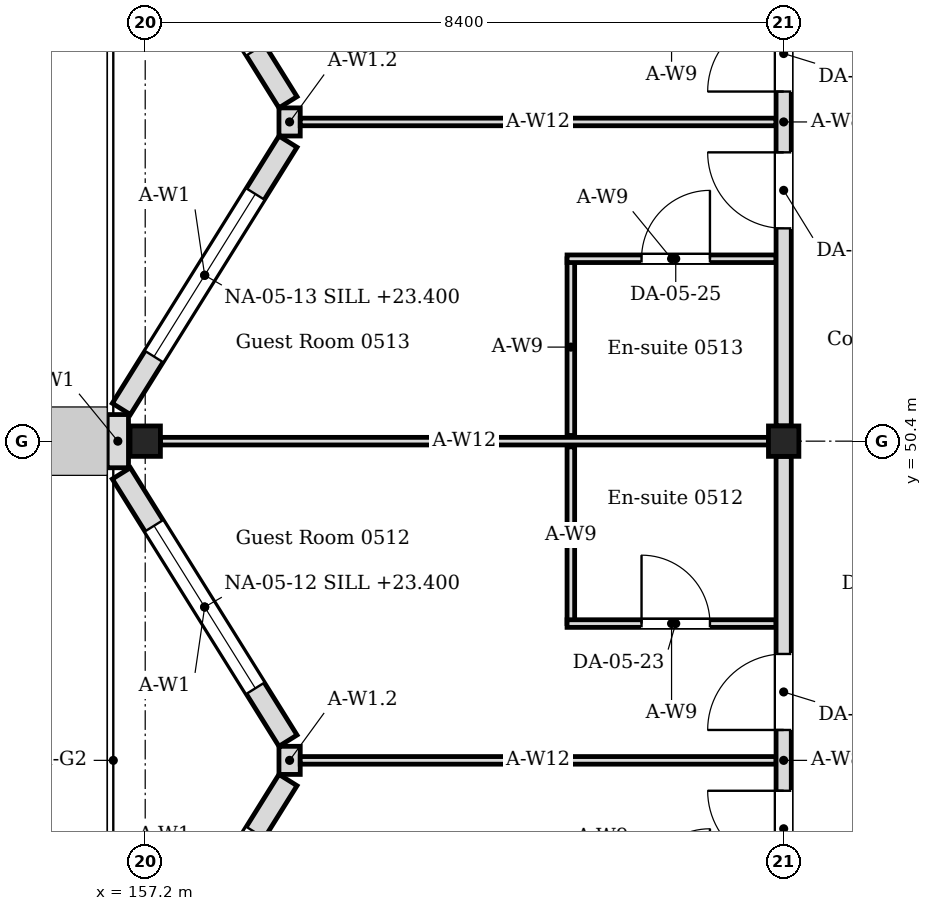
"""IFC4 building model, lengths in metres.
Left out: names, types, materials, properties, quantities, classifications, styles, units other than length and angle.
Written with IfcOpenShell. Run it as: python <this file> out.ifc"""

import sys

from ifc_helpers import new_model, si_unit, direction, frame, frame_2d, origin, origin_2d, place, context, subcontext, project, spatial, rectangle, i_section, extrude, element, fill, save


model = new_model("IFC4")
c1 = context("Model", 3, precision=1e-05, world=origin(), true_north=direction((0.0, 1.0)))
c2 = subcontext(c1, "Body", "Model", "MODEL_VIEW")
j1 = project(units=[si_unit("LENGTHUNIT", "METRE"), si_unit("PLANEANGLEUNIT", "RADIAN")], contexts=[c1])
p1 = place(None, origin())
s1 = spatial("IfcSite", under=j1, at=p1, CompositionType="ELEMENT")
p2 = place(p1, origin())
s2 = spatial("IfcBuilding", under=s1, at=p2, CompositionType="ELEMENT")
p3 = place(p2, frame((0.0, 0.0, 22.8)))
s3 = spatial("IfcBuildingStorey", under=s2, at=p3, CompositionType="ELEMENT", Elevation=22.8)
for number, where, z_axis, x_axis in (
    (1, (157.2, 50.4, 0.0), (0.0, 0.0, 1.0), (1.0, 0.0, 0.0)),
    (2, (165.6, 50.4, 0.0), (0.0, 0.0, 1.0), (1.0, 0.0, 0.0)),
):
    element("IfcColumn", number, at=place(p3, frame(where, z_axis=z_axis, x_axis=x_axis)), inside=s3, PredefinedType="COLUMN", context=c2, shape_type="SweptSolid", body=[
        extrude(i_section(OverallWidth=0.4, OverallDepth=0.4, WebThickness=0.013, FlangeThickness=0.021, FilletRadius=0.022, at=origin_2d()), origin(), (0.0, 0.0, 1.0), 4.2),
    ])
p4 = place(p3, frame((156.886, 42.424, 0.0), z_axis=(0.0, 0.0, 1.0), x_axis=(0.529018946142, 0.848610013271, 0.0)))
e3 = element("IfcWall", 3, at=p4, inside=s3, PredefinedType="SOLIDWALL", context=c2, shape_type="SweptSolid", body=[
    extrude(rectangle(XDim=4.144, YDim=0.28, at=frame_2d((2.072, 0.0))), origin(), (0.0, 0.0, 1.0), 4.05),
])
p5 = place(p4, frame((0.812, 0.0, 0.6)))
e4 = element("IfcOpeningElement", 4, at=p5, cuts=e3, PredefinedType="OPENING", context=c2, shape_type="SweptSolid", body=[
    extrude(rectangle(XDim=2.52, YDim=2.4, at=frame_2d((1.26, 1.2))), frame((0.0, 0.15, 0.0), z_axis=(0.0, -1.0, 0.0), x_axis=(1.0, 0.0, 0.0)), (0.0, 0.0, 1.0), 0.3),
])
p6 = place(p3, frame((159.079, 46.459, 0.0), z_axis=(0.0, 0.0, 1.0), x_axis=(-0.529018946142, 0.848610013271, 0.0)))
e5 = element("IfcWall", 5, at=p6, inside=s3, PredefinedType="SOLIDWALL", context=c2, shape_type="SweptSolid", body=[
    extrude(rectangle(XDim=4.144, YDim=0.28, at=frame_2d((2.072, 0.0))), origin(), (0.0, 0.0, 1.0), 4.05),
])
p7 = place(p6, frame((0.812, 0.0, 0.6)))
e6 = element("IfcOpeningElement", 6, at=p7, cuts=e5, PredefinedType="OPENING", context=c2, shape_type="SweptSolid", body=[
    extrude(rectangle(XDim=2.52, YDim=2.4, at=frame_2d((1.26, 1.2))), frame((0.0, 0.15, 0.0), z_axis=(0.0, -1.0, 0.0), x_axis=(1.0, 0.0, 0.0)), (0.0, 0.0, 1.0), 0.3),
])
p8 = place(p3, frame((159.1, 46.015, 0.0), z_axis=(0.0, 0.0, 1.0), x_axis=(0.0, 1.0, 0.0)))
e7 = element("IfcWall", 7, at=p8, inside=s3, PredefinedType="SOLIDWALL", context=c2, shape_type="SweptSolid", body=[
    extrude(rectangle(XDim=0.37, YDim=0.28, at=frame_2d((0.185, 0.0))), origin(), (0.0, 0.0, 1.0), 3.604),
])
p9 = place(p3, frame((156.84, 50.05, 0.0), z_axis=(0.0, 0.0, 1.0), x_axis=(0.0, 1.0, 0.0)))
e8 = element("IfcWall", 8, at=p9, inside=s3, PredefinedType="SOLIDWALL", context=c2, shape_type="SweptSolid", body=[
    extrude(rectangle(XDim=0.7, YDim=0.28, at=frame_2d((0.35, 0.0))), origin(), (0.0, 0.0, 1.0), 4.05),
])
p10 = place(p3, frame((156.886, 50.824, 0.0), z_axis=(0.0, 0.0, 1.0), x_axis=(0.529018946142, 0.848610013271, 0.0)))
e9 = element("IfcWall", 9, at=p10, inside=s3, PredefinedType="SOLIDWALL", context=c2, shape_type="SweptSolid", body=[
    extrude(rectangle(XDim=4.144, YDim=0.28, at=frame_2d((2.072, 0.0))), origin(), (0.0, 0.0, 1.0), 4.05),
])
p11 = place(p10, frame((0.812, 0.0, 0.6)))
e10 = element("IfcOpeningElement", 10, at=p11, cuts=e9, PredefinedType="OPENING", context=c2, shape_type="SweptSolid", body=[
    extrude(rectangle(XDim=2.52, YDim=2.4, at=frame_2d((1.26, 1.2))), frame((0.0, 0.15, 0.0), z_axis=(0.0, -1.0, 0.0), x_axis=(1.0, 0.0, 0.0)), (0.0, 0.0, 1.0), 0.3),
])
p12 = place(p3, frame((159.079, 54.859, 0.0), z_axis=(0.0, 0.0, 1.0), x_axis=(-0.528992500338, 0.848626498871, 0.0)))
e11 = element("IfcWall", 11, at=p12, inside=s3, PredefinedType="SOLIDWALL", context=c2, shape_type="SweptSolid", body=[
    extrude(rectangle(XDim=4.145, YDim=0.28, at=frame_2d((2.072, 0.0))), origin(), (0.0, 0.0, 1.0), 4.05),
])
p13 = place(p12, frame((0.812, 0.0, 0.6)))
e12 = element("IfcOpeningElement", 12, at=p13, cuts=e11, PredefinedType="OPENING", context=c2, shape_type="SweptSolid", body=[
    extrude(rectangle(XDim=2.52, YDim=2.4, at=frame_2d((1.26, 1.2))), frame((0.0, 0.15, 0.0), z_axis=(0.0, -1.0, 0.0), x_axis=(1.0, 0.0, 0.0)), (0.0, 0.0, 1.0), 0.3),
])
p14 = place(p3, frame((159.1, 54.415, 0.0), z_axis=(0.0, 0.0, 1.0), x_axis=(0.0, 1.0, 0.0)))
e13 = element("IfcWall", 13, at=p14, inside=s3, PredefinedType="SOLIDWALL", context=c2, shape_type="SweptSolid", body=[
    extrude(rectangle(XDim=0.37, YDim=0.28, at=frame_2d((0.185, 0.0))), origin(), (0.0, 0.0, 1.0), 3.604),
])
p15 = place(p3, frame((162.8, 48.0, 0.0), z_axis=(0.0, 0.0, 1.0), x_axis=(0.0, 1.0, 0.0)))
e14 = element("IfcWall", 14, at=p15, inside=s3, PredefinedType="PARTITIONING", context=c2, shape_type="SweptSolid", body=[
    extrude(rectangle(XDim=2.325, YDim=0.1, at=frame_2d((1.163, 0.0))), origin(), (0.0, 0.0, 1.0), 4.05),
])
p16 = place(p3, frame((162.75, 48.0, 0.0), z_axis=(0.0, 0.0, 1.0), x_axis=(1.0, 0.0, 0.0)))
e15 = element("IfcWall", 15, at=p16, inside=s3, PredefinedType="PARTITIONING", context=c2, shape_type="SweptSolid", body=[
    extrude(rectangle(XDim=2.75, YDim=0.1, at=frame_2d((1.375, 0.0))), origin(), (0.0, 0.0, 1.0), 4.05),
])
p17 = place(p16, frame((0.98, 0.0, 0.0)))
e16 = element("IfcOpeningElement", 16, at=p17, cuts=e15, PredefinedType="OPENING", context=c2, shape_type="SweptSolid", body=[
    extrude(rectangle(XDim=0.9, YDim=2.1, at=frame_2d((0.45, 1.05))), frame((0.0, 0.06, 0.0), z_axis=(0.0, -1.0, 0.0), x_axis=(1.0, 0.0, 0.0)), (0.0, 0.0, 1.0), 0.12),
])
p18 = place(p3, frame((162.8, 50.475, 0.0), z_axis=(0.0, 0.0, 1.0), x_axis=(0.0, 1.0, 0.0)))
e17 = element("IfcWall", 17, at=p18, inside=s3, PredefinedType="PARTITIONING", context=c2, shape_type="SweptSolid", body=[
    extrude(rectangle(XDim=2.325, YDim=0.1, at=frame_2d((1.163, 0.0))), origin(), (0.0, 0.0, 1.0), 4.05),
])
p19 = place(p3, frame((162.75, 52.8, 0.0), z_axis=(0.0, 0.0, 1.0), x_axis=(1.0, 0.0, 0.0)))
e18 = element("IfcWall", 18, at=p19, inside=s3, PredefinedType="PARTITIONING", context=c2, shape_type="SweptSolid", body=[
    extrude(rectangle(XDim=2.75, YDim=0.1, at=frame_2d((1.375, 0.0))), origin(), (0.0, 0.0, 1.0), 4.05),
])
p20 = place(p19, frame((0.98, 0.0, 0.0)))
e19 = element("IfcOpeningElement", 19, at=p20, cuts=e18, PredefinedType="OPENING", context=c2, shape_type="SweptSolid", body=[
    extrude(rectangle(XDim=0.9, YDim=2.1, at=frame_2d((0.45, 1.05))), frame((0.0, 0.06, 0.0), z_axis=(0.0, -1.0, 0.0), x_axis=(1.0, 0.0, 0.0)), (0.0, 0.0, 1.0), 0.12),
])
p21 = place(p3, frame((157.4, 50.4, 0.0), z_axis=(0.0, 0.0, 1.0), x_axis=(1.0, 0.0, 0.0)))
e20 = element("IfcWall", 20, at=p21, inside=s3, PredefinedType="PARTITIONING", context=c2, shape_type="SweptSolid", body=[
    extrude(rectangle(XDim=8.0, YDim=0.1, at=frame_2d((4.0, 0.0))), origin(), (0.0, 0.0, 1.0), 3.604),
])
for number, where, z_axis, x_axis in (
    (21, (159.24, 46.2, 0.0), (0.0, 0.0, 1.0), (1.0, 0.0, 0.0)),
    (22, (159.24, 54.6, 0.0), (0.0, 0.0, 1.0), (1.0, 0.0, 0.0)),
):
    element("IfcWall", number, at=place(p3, frame(where, z_axis=z_axis, x_axis=x_axis)), inside=s3, PredefinedType="PARTITIONING", context=c2, shape_type="SweptSolid", body=[
        extrude(rectangle(XDim=6.26, YDim=0.1, at=frame_2d((3.13, 0.0))), origin(), (0.0, 0.0, 1.0), 3.604),
    ])
p22 = place(p3, frame((165.6, 42.2, 0.0), z_axis=(0.0, 0.0, 1.0), x_axis=(0.0, 1.0, 0.0)))
e23 = element("IfcWall", 23, at=p22, inside=s3, PredefinedType="PARTITIONING", context=c2, shape_type="SweptSolid", body=[
    extrude(rectangle(XDim=8.0, YDim=0.2, at=frame_2d((4.0, 0.0))), origin(), (0.0, 0.0, 1.0), 3.45),
])
p23 = place(p22, frame((2.6, 0.0, 0.0)))
e24 = element("IfcOpeningElement", 24, at=p23, cuts=e23, PredefinedType="OPENING", context=c2, shape_type="SweptSolid", body=[
    extrude(rectangle(XDim=1.0, YDim=2.4, at=frame_2d((0.5, 1.2))), frame((0.0, 0.11, 0.0), z_axis=(0.0, -1.0, 0.0), x_axis=(1.0, 0.0, 0.0)), (0.0, 0.0, 1.0), 0.22),
])
p24 = place(p22, frame((4.4, 0.0, 0.0)))
e25 = element("IfcOpeningElement", 25, at=p24, cuts=e23, PredefinedType="OPENING", context=c2, shape_type="SweptSolid", body=[
    extrude(rectangle(XDim=1.0, YDim=2.4, at=frame_2d((0.5, 1.2))), frame((0.0, 0.11, 0.0), z_axis=(0.0, -1.0, 0.0), x_axis=(1.0, 0.0, 0.0)), (0.0, 0.0, 1.0), 0.22),
])
p25 = place(p3, frame((165.6, 50.6, 0.0), z_axis=(0.0, 0.0, 1.0), x_axis=(0.0, 1.0, 0.0)))
e26 = element("IfcWall", 26, at=p25, inside=s3, PredefinedType="PARTITIONING", context=c2, shape_type="SweptSolid", body=[
    extrude(rectangle(XDim=8.0, YDim=0.2, at=frame_2d((4.0, 0.0))), origin(), (0.0, 0.0, 1.0), 3.45),
])
p26 = place(p25, frame((2.6, 0.0, 0.0)))
e27 = element("IfcOpeningElement", 27, at=p26, cuts=e26, PredefinedType="OPENING", context=c2, shape_type="SweptSolid", body=[
    extrude(rectangle(XDim=1.0, YDim=2.4, at=frame_2d((0.5, 1.2))), frame((0.0, 0.11, 0.0), z_axis=(0.0, -1.0, 0.0), x_axis=(1.0, 0.0, 0.0)), (0.0, 0.0, 1.0), 0.22),
])
p27 = place(p25, frame((4.4, 0.0, 0.0)))
e28 = element("IfcOpeningElement", 28, at=p27, cuts=e26, PredefinedType="OPENING", context=c2, shape_type="SweptSolid", body=[
    extrude(rectangle(XDim=1.0, YDim=2.4, at=frame_2d((0.5, 1.2))), frame((0.0, 0.11, 0.0), z_axis=(0.0, -1.0, 0.0), x_axis=(1.0, 0.0, 0.0)), (0.0, 0.0, 1.0), 0.22),
])
p28 = place(p7, origin())
e29 = element("IfcWindow", 29, at=p28, inside=s3, PartitioningType="SINGLE_PANEL", PredefinedType="WINDOW", context=c2, shape_type="SweptSolid", body=[
    extrude(rectangle(XDim=2.52, YDim=2.4, at=frame_2d((1.26, 1.2))), frame((0.0, 0.03, 0.0), z_axis=(0.0, -1.0, 0.0), x_axis=(1.0, 0.0, 0.0)), (0.0, 0.0, 1.0), 0.06),
])
fill(e6, e29)
p29 = place(p11, origin())
e30 = element("IfcWindow", 30, at=p29, inside=s3, PartitioningType="SINGLE_PANEL", PredefinedType="WINDOW", context=c2, shape_type="SweptSolid", body=[
    extrude(rectangle(XDim=2.52, YDim=2.4, at=frame_2d((1.26, 1.2))), frame((0.0, 0.03, 0.0), z_axis=(0.0, -1.0, 0.0), x_axis=(1.0, 0.0, 0.0)), (0.0, 0.0, 1.0), 0.06),
])
fill(e10, e30)
p30 = place(p23, origin())
e31 = element("IfcDoor", 31, at=p30, inside=s3, OperationType="SINGLE_SWING_RIGHT", PredefinedType="DOOR", context=c2, shape_type="SweptSolid", body=[
    extrude(rectangle(XDim=1.0, YDim=2.4, at=frame_2d((0.5, 1.2))), frame((0.0, 0.025, 0.0), z_axis=(0.0, -1.0, 0.0), x_axis=(1.0, 0.0, 0.0)), (0.0, 0.0, 1.0), 0.05),
])
fill(e24, e31)
p31 = place(p17, origin())
e32 = element("IfcDoor", 32, at=p31, inside=s3, OperationType="SINGLE_SWING_LEFT", PredefinedType="DOOR", context=c2, shape_type="SweptSolid", body=[
    extrude(rectangle(XDim=0.9, YDim=2.1, at=frame_2d((0.45, 1.05))), frame((0.0, 0.025, 0.0), z_axis=(0.0, -1.0, 0.0), x_axis=(1.0, 0.0, 0.0)), (0.0, 0.0, 1.0), 0.05),
])
fill(e16, e32)
p32 = place(p24, origin())
e33 = element("IfcDoor", 33, at=p32, inside=s3, OperationType="SINGLE_SWING_LEFT", PredefinedType="DOOR", context=c2, shape_type="SweptSolid", body=[
    extrude(rectangle(XDim=1.0, YDim=2.4, at=frame_2d((0.5, 1.2))), frame((0.0, 0.025, 0.0), z_axis=(0.0, -1.0, 0.0), x_axis=(1.0, 0.0, 0.0)), (0.0, 0.0, 1.0), 0.05),
])
fill(e25, e33)
p33 = place(p20, origin())
e34 = element("IfcDoor", 34, at=p33, inside=s3, OperationType="SINGLE_SWING_RIGHT", PredefinedType="DOOR", context=c2, shape_type="SweptSolid", body=[
    extrude(rectangle(XDim=0.9, YDim=2.1, at=frame_2d((0.45, 1.05))), frame((0.0, 0.025, 0.0), z_axis=(0.0, -1.0, 0.0), x_axis=(1.0, 0.0, 0.0)), (0.0, 0.0, 1.0), 0.05),
])
fill(e19, e34)
p34 = place(p26, origin())
e35 = element("IfcDoor", 35, at=p34, inside=s3, OperationType="SINGLE_SWING_RIGHT", PredefinedType="DOOR", context=c2, shape_type="SweptSolid", body=[
    extrude(rectangle(XDim=1.0, YDim=2.4, at=frame_2d((0.5, 1.2))), frame((0.0, 0.025, 0.0), z_axis=(0.0, -1.0, 0.0), x_axis=(1.0, 0.0, 0.0)), (0.0, 0.0, 1.0), 0.05),
])
fill(e27, e35)
p35 = place(p27, origin())
e36 = element("IfcDoor", 36, at=p35, inside=s3, OperationType="SINGLE_SWING_LEFT", PredefinedType="DOOR", context=c2, shape_type="SweptSolid", body=[
    extrude(rectangle(XDim=1.0, YDim=2.4, at=frame_2d((0.5, 1.2))), frame((0.0, 0.025, 0.0), z_axis=(0.0, -1.0, 0.0), x_axis=(1.0, 0.0, 0.0)), (0.0, 0.0, 1.0), 0.05),
])
fill(e28, e36)
save(model, sys.argv[1])
